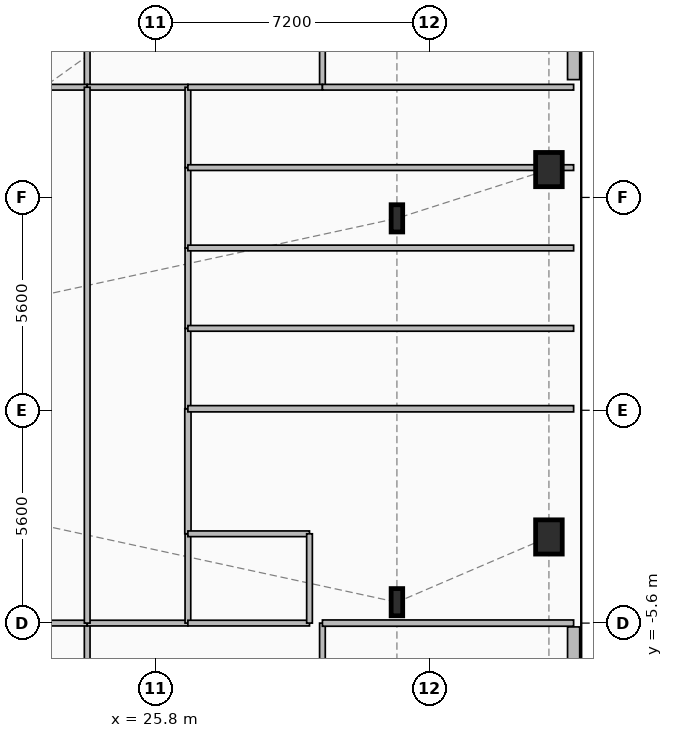
"""IFC4 building model, lengths in metres.
Left out: names, types, materials, properties, quantities, classifications, styles, units other than length and angle.
Written with IfcOpenShell. Run it as: python <this file> out.ifc"""

import sys

from ifc_helpers import new_model, si_unit, direction, frame, frame_2d, origin, origin_2d, place, context, subcontext, project, spatial, rectangle, i_section, extrude, element, fill, save


model = new_model("IFC4")
c1 = context("Model", 3, precision=1e-05, world=origin(), true_north=direction((0.0, 1.0)))
c2 = subcontext(c1, "Body", "Model", "MODEL_VIEW")
j1 = project(units=[si_unit("LENGTHUNIT", "METRE"), si_unit("PLANEANGLEUNIT", "RADIAN")], contexts=[c1])
p1 = place(None, origin())
s1 = spatial("IfcSite", under=j1, at=p1, CompositionType="ELEMENT")
p2 = place(p1, origin())
s2 = spatial("IfcBuilding", under=s1, at=p2, CompositionType="ELEMENT")
p3 = place(p2, frame((0.0, 0.0, 22.5)))
s3 = spatial("IfcBuildingStorey", under=s2, at=p3, CompositionType="ELEMENT", Elevation=22.5)
for number, where, z_axis, x_axis in (
    (1, (36.15, -3.333, 0.0), (0.0, 0.0, 1.0), (1.0, 0.0, 0.0)),
    (2, (36.15, 6.333, 0.0), (0.0, 0.0, 1.0), (1.0, 0.0, 0.0)),
):
    element("IfcColumn", number, at=place(p3, frame(where, z_axis=z_axis, x_axis=x_axis)), inside=s3, PredefinedType="COLUMN", context=c2, shape_type="SweptSolid", body=[
        extrude(rectangle(XDim=0.7, YDim=0.9, at=origin_2d()), origin(), (0.0, 0.0, 1.0), 4.5),
    ])
for number, where, z_axis, x_axis in (
    (3, (32.15, -5.05, 0.0), (0.0, 0.0, 1.0), (1.0, 0.0, 0.0)),
    (4, (32.15, 5.05, 0.0), (0.0, 0.0, 1.0), (1.0, 0.0, 0.0)),
):
    element("IfcColumn", number, at=place(p3, frame(where, z_axis=z_axis, x_axis=x_axis)), inside=s3, PredefinedType="COLUMN", context=c2, shape_type="SweptSolid", body=[
        extrude(i_section(OverallWidth=0.304, OverallDepth=0.716, WebThickness=0.021, FlangeThickness=0.04, FilletRadius=0.027, at=origin_2d()), origin(), (0.0, 0.0, 1.0), 4.5),
    ])
p4 = place(p3, frame((36.8, 24.8, 0.0), z_axis=(0.0, 0.0, 1.0), x_axis=(0.0, -1.0, 0.0)))
e5 = element("IfcWall", 5, at=p4, inside=s3, PredefinedType="SOLIDWALL", context=c2, shape_type="SweptSolid", body=[
    extrude(rectangle(XDim=16.1, YDim=0.32, at=frame_2d((8.05, 0.0))), origin(), (0.0, 0.0, 1.0), 4.16),
])
p5 = place(p4, frame((5.067, 0.0, 0.85)))
e6 = element("IfcOpeningElement", 6, at=p5, cuts=e5, PredefinedType="OPENING", context=c2, shape_type="SweptSolid", body=[
    extrude(rectangle(XDim=2.6, YDim=2.4, at=frame_2d((1.3, 1.2))), frame((0.0, 0.17, 0.0), z_axis=(0.0, -1.0, 0.0), x_axis=(1.0, 0.0, 0.0)), (0.0, 0.0, 1.0), 0.34),
])
p6 = place(p3, frame((36.8, -5.7, 0.0), z_axis=(0.0, 0.0, 1.0), x_axis=(0.0, -1.0, 0.0)))
e7 = element("IfcWall", 7, at=p6, inside=s3, PredefinedType="SOLIDWALL", context=c2, shape_type="SweptSolid", body=[
    extrude(rectangle(XDim=16.1, YDim=0.32, at=frame_2d((8.05, 0.0))), origin(), (0.0, 0.0, 1.0), 4.16),
])
p7 = place(p6, frame((8.485, 0.0, 0.85)))
e8 = element("IfcOpeningElement", 8, at=p7, cuts=e7, PredefinedType="OPENING", context=c2, shape_type="SweptSolid", body=[
    extrude(rectangle(XDim=2.6, YDim=2.4, at=frame_2d((1.3, 1.2))), frame((0.0, 0.17, 0.0), z_axis=(0.0, -1.0, 0.0), x_axis=(1.0, 0.0, 0.0)), (0.0, 0.0, 1.0), 0.34),
])
p8 = place(p3, frame((24.0, 10.65, 0.0), z_axis=(0.0, 0.0, 1.0), x_axis=(0.0, -1.0, 0.0)))
e9 = element("IfcWall", 9, at=p8, inside=s3, PredefinedType="PARTITIONING", context=c2, shape_type="SweptSolid", body=[
    extrude(rectangle(XDim=2.15, YDim=0.15, at=frame_2d((1.075, 0.0))), origin(), (0.0, 0.0, 1.0), 4.16),
])
p9 = place(p8, frame((0.625, 0.0, 0.0)))
e10 = element("IfcOpeningElement", 10, at=p9, cuts=e9, PredefinedType="OPENING", context=c2, shape_type="SweptSolid", body=[
    extrude(rectangle(XDim=0.9, YDim=2.1, at=frame_2d((0.45, 1.05))), frame((0.0, 0.085, 0.0), z_axis=(0.0, -1.0, 0.0), x_axis=(1.0, 0.0, 0.0)), (0.0, 0.0, 1.0), 0.17),
])
p10 = place(p3, frame((24.0, 8.5, 0.0), z_axis=(0.0, 0.0, 1.0), x_axis=(-1.0, 0.0, 0.0)))
e11 = element("IfcWall", 11, at=p10, inside=s3, PredefinedType="PARTITIONING", context=c2, shape_type="SweptSolid", body=[
    extrude(rectangle(XDim=5.2, YDim=0.15, at=frame_2d((2.6, 0.0))), origin(), (0.0, 0.0, 1.0), 4.16),
])
p11 = place(p10, frame((0.954, 0.0, 0.0)))
e12 = element("IfcOpeningElement", 12, at=p11, cuts=e11, PredefinedType="OPENING", context=c2, shape_type="SweptSolid", body=[
    extrude(rectangle(XDim=1.05, YDim=2.15, at=frame_2d((0.525, 1.075))), frame((0.0, 0.085, 0.0), z_axis=(0.0, -1.0, 0.0), x_axis=(1.0, 0.0, 0.0)), (0.0, 0.0, 1.0), 0.17),
])
p12 = place(p3, frame((24.0, -5.6, 0.0), z_axis=(0.0, 0.0, 1.0), x_axis=(0.0, -1.0, 0.0)))
e13 = element("IfcWall", 13, at=p12, inside=s3, PredefinedType="PARTITIONING", context=c2, shape_type="SweptSolid", body=[
    extrude(rectangle(XDim=2.15, YDim=0.15, at=frame_2d((1.075, 0.0))), origin(), (0.0, 0.0, 1.0), 4.16),
])
p13 = place(p12, frame((0.625, 0.0, 0.0)))
e14 = element("IfcOpeningElement", 14, at=p13, cuts=e13, PredefinedType="OPENING", context=c2, shape_type="SweptSolid", body=[
    extrude(rectangle(XDim=0.9, YDim=2.1, at=frame_2d((0.45, 1.05))), frame((0.0, 0.085, 0.0), z_axis=(0.0, -1.0, 0.0), x_axis=(1.0, 0.0, 0.0)), (0.0, 0.0, 1.0), 0.17),
])
p14 = place(p3, frame((18.8, -5.6, 0.0), z_axis=(0.0, 0.0, 1.0), x_axis=(1.0, 0.0, 0.0)))
e15 = element("IfcWall", 15, at=p14, inside=s3, PredefinedType="PARTITIONING", context=c2, shape_type="SweptSolid", body=[
    extrude(rectangle(XDim=5.2, YDim=0.15, at=frame_2d((2.6, 0.0))), origin(), (0.0, 0.0, 1.0), 4.16),
])
p15 = place(p3, frame((24.0, 8.5, 0.0), z_axis=(0.0, 0.0, 1.0), x_axis=(1.0, 0.0, 0.0)))
e16 = element("IfcWall", 16, at=p15, inside=s3, PredefinedType="PARTITIONING", context=c2, shape_type="SweptSolid", body=[
    extrude(rectangle(XDim=2.65, YDim=0.15, at=frame_2d((1.325, 0.0))), origin(), (0.0, 0.0, 1.0), 4.16),
])
p16 = place(p15, frame((0.965, 0.0, 0.0)))
e17 = element("IfcOpeningElement", 17, at=p16, cuts=e16, PredefinedType="OPENING", context=c2, shape_type="SweptSolid", body=[
    extrude(rectangle(XDim=1.05, YDim=2.15, at=frame_2d((0.525, 1.075))), frame((0.0, 0.085, 0.0), z_axis=(0.0, -1.0, 0.0), x_axis=(1.0, 0.0, 0.0)), (0.0, 0.0, 1.0), 0.17),
])
p17 = place(p3, frame((26.65, -5.6, 0.0), z_axis=(0.0, 0.0, 1.0), x_axis=(-1.0, 0.0, 0.0)))
e18 = element("IfcWall", 18, at=p17, inside=s3, PredefinedType="PARTITIONING", context=c2, shape_type="SweptSolid", body=[
    extrude(rectangle(XDim=2.65, YDim=0.15, at=frame_2d((1.325, 0.0))), origin(), (0.0, 0.0, 1.0), 4.16),
])
p18 = place(p17, frame((0.635, 0.0, 0.0)))
e19 = element("IfcOpeningElement", 19, at=p18, cuts=e18, PredefinedType="OPENING", context=c2, shape_type="SweptSolid", body=[
    extrude(rectangle(XDim=1.05, YDim=2.15, at=frame_2d((0.525, 1.075))), frame((0.0, 0.085, 0.0), z_axis=(0.0, -1.0, 0.0), x_axis=(1.0, 0.0, 0.0)), (0.0, 0.0, 1.0), 0.17),
])
p19 = place(p3, frame((26.65, -3.25, 0.0), z_axis=(0.0, 0.0, 1.0), x_axis=(0.0, -1.0, 0.0)))
e20 = element("IfcWall", 20, at=p19, inside=s3, PredefinedType="PLUMBINGWALL", context=c2, shape_type="SweptSolid", body=[
    extrude(rectangle(XDim=2.35, YDim=0.15, at=frame_2d((1.175, 0.0))), origin(), (0.0, 0.0, 1.0), 4.16),
])
p20 = place(p19, frame((0.616, 0.0, 0.0)))
e21 = element("IfcOpeningElement", 21, at=p20, cuts=e20, PredefinedType="OPENING", context=c2, shape_type="SweptSolid", body=[
    extrude(rectangle(XDim=0.9, YDim=2.1, at=frame_2d((0.45, 1.05))), frame((0.0, 0.085, 0.0), z_axis=(0.0, -1.0, 0.0), x_axis=(1.0, 0.0, 0.0)), (0.0, 0.0, 1.0), 0.17),
])
p21 = place(p3, frame((26.65, 0.04, 0.0), z_axis=(0.0, 0.0, 1.0), x_axis=(0.0, -1.0, 0.0)))
e22 = element("IfcWall", 22, at=p21, inside=s3, PredefinedType="PARTITIONING", context=c2, shape_type="SweptSolid", body=[
    extrude(rectangle(XDim=3.29, YDim=0.165, at=frame_2d((1.645, 0.0))), origin(), (0.0, 0.0, 1.0), 4.16),
])
p22 = place(p21, frame((0.702, 0.0, 0.0)))
e23 = element("IfcOpeningElement", 23, at=p22, cuts=e22, PredefinedType="OPENING", context=c2, shape_type="SweptSolid", body=[
    extrude(rectangle(XDim=1.15, YDim=2.15, at=frame_2d((0.575, 1.075))), frame((0.0, 0.093, 0.0), z_axis=(0.0, -1.0, 0.0), x_axis=(1.0, 0.0, 0.0)), (0.0, 0.0, 1.0), 0.185),
])
p23 = place(p3, frame((26.65, 2.155, 0.0), z_axis=(0.0, 0.0, 1.0), x_axis=(0.0, -1.0, 0.0)))
e24 = element("IfcWall", 24, at=p23, inside=s3, PredefinedType="PARTITIONING", context=c2, shape_type="SweptSolid", body=[
    extrude(rectangle(XDim=2.115, YDim=0.15, at=frame_2d((1.058, 0.0))), origin(), (0.0, 0.0, 1.0), 4.16),
])
p24 = place(p23, frame((0.583, 0.0, 0.0)))
e25 = element("IfcOpeningElement", 25, at=p24, cuts=e24, PredefinedType="OPENING", context=c2, shape_type="SweptSolid", body=[
    extrude(rectangle(XDim=0.95, YDim=2.1, at=frame_2d((0.475, 1.05))), frame((0.0, 0.085, 0.0), z_axis=(0.0, -1.0, 0.0), x_axis=(1.0, 0.0, 0.0)), (0.0, 0.0, 1.0), 0.17),
])
p25 = place(p3, frame((26.65, 4.27, 0.0), z_axis=(0.0, 0.0, 1.0), x_axis=(0.0, -1.0, 0.0)))
e26 = element("IfcWall", 26, at=p25, inside=s3, PredefinedType="PARTITIONING", context=c2, shape_type="SweptSolid", body=[
    extrude(rectangle(XDim=2.115, YDim=0.15, at=frame_2d((1.058, 0.0))), origin(), (0.0, 0.0, 1.0), 4.16),
])
p26 = place(p25, frame((0.583, 0.0, 0.0)))
e27 = element("IfcOpeningElement", 27, at=p26, cuts=e26, PredefinedType="OPENING", context=c2, shape_type="SweptSolid", body=[
    extrude(rectangle(XDim=0.95, YDim=2.1, at=frame_2d((0.475, 1.05))), frame((0.0, 0.085, 0.0), z_axis=(0.0, -1.0, 0.0), x_axis=(1.0, 0.0, 0.0)), (0.0, 0.0, 1.0), 0.17),
])
p27 = place(p3, frame((26.65, 6.385, 0.0), z_axis=(0.0, 0.0, 1.0), x_axis=(0.0, -1.0, 0.0)))
e28 = element("IfcWall", 28, at=p27, inside=s3, PredefinedType="PARTITIONING", context=c2, shape_type="SweptSolid", body=[
    extrude(rectangle(XDim=2.115, YDim=0.15, at=frame_2d((1.058, 0.0))), origin(), (0.0, 0.0, 1.0), 4.16),
])
p28 = place(p27, frame((0.583, 0.0, 0.0)))
e29 = element("IfcOpeningElement", 29, at=p28, cuts=e28, PredefinedType="OPENING", context=c2, shape_type="SweptSolid", body=[
    extrude(rectangle(XDim=0.95, YDim=2.1, at=frame_2d((0.475, 1.05))), frame((0.0, 0.085, 0.0), z_axis=(0.0, -1.0, 0.0), x_axis=(1.0, 0.0, 0.0)), (0.0, 0.0, 1.0), 0.17),
])
p29 = place(p3, frame((26.65, 8.5, 0.0), z_axis=(0.0, 0.0, 1.0), x_axis=(0.0, -1.0, 0.0)))
e30 = element("IfcWall", 30, at=p29, inside=s3, PredefinedType="PARTITIONING", context=c2, shape_type="SweptSolid", body=[
    extrude(rectangle(XDim=2.115, YDim=0.15, at=frame_2d((1.058, 0.0))), origin(), (0.0, 0.0, 1.0), 4.16),
])
p30 = place(p29, frame((0.583, 0.0, 0.0)))
e31 = element("IfcOpeningElement", 31, at=p30, cuts=e30, PredefinedType="OPENING", context=c2, shape_type="SweptSolid", body=[
    extrude(rectangle(XDim=0.95, YDim=2.1, at=frame_2d((0.475, 1.05))), frame((0.0, 0.085, 0.0), z_axis=(0.0, -1.0, 0.0), x_axis=(1.0, 0.0, 0.0)), (0.0, 0.0, 1.0), 0.17),
])
p31 = place(p3, frame((24.0, -5.6, 0.0), z_axis=(0.0, 0.0, 1.0), x_axis=(0.0, 1.0, 0.0)))
e32 = element("IfcWall", 32, at=p31, inside=s3, PredefinedType="PARTITIONING", context=c2, shape_type="SweptSolid", body=[
    extrude(rectangle(XDim=14.1, YDim=0.15, at=frame_2d((7.05, 0.0))), origin(), (0.0, 0.0, 1.0), 4.16),
])
p32 = place(p3, frame((30.19, 24.8, 0.0), z_axis=(0.0, 0.0, 1.0), x_axis=(0.0, -1.0, 0.0)))
e33 = element("IfcWall", 33, at=p32, inside=s3, PredefinedType="PARTITIONING", context=c2, shape_type="SweptSolid", body=[
    extrude(rectangle(XDim=16.3, YDim=0.15, at=frame_2d((8.15, 0.0))), origin(), (0.0, 0.0, 1.0), 4.16),
])
p33 = place(p32, frame((12.909, 0.0, 0.0)))
e34 = element("IfcOpeningElement", 34, at=p33, cuts=e33, PredefinedType="OPENING", context=c2, shape_type="SweptSolid", body=[
    extrude(rectangle(XDim=1.05, YDim=2.15, at=frame_2d((0.525, 1.075))), frame((0.0, 0.085, 0.0), z_axis=(0.0, -1.0, 0.0), x_axis=(1.0, 0.0, 0.0)), (0.0, 0.0, 1.0), 0.17),
])
p34 = place(p3, frame((30.19, 8.5, 0.0), z_axis=(0.0, 0.0, 1.0), x_axis=(-1.0, 0.0, 0.0)))
e35 = element("IfcWall", 35, at=p34, inside=s3, PredefinedType="PARTITIONING", context=c2, shape_type="SweptSolid", body=[
    extrude(rectangle(XDim=3.54, YDim=0.15, at=frame_2d((1.77, 0.0))), origin(), (0.0, 0.0, 1.0), 4.16),
])
p35 = place(p3, frame((36.8, 8.5, 0.0), z_axis=(0.0, 0.0, 1.0), x_axis=(-1.0, 0.0, 0.0)))
e36 = element("IfcWall", 36, at=p35, inside=s3, PredefinedType="PARTITIONING", context=c2, shape_type="SweptSolid", body=[
    extrude(rectangle(XDim=6.61, YDim=0.15, at=frame_2d((3.305, 0.0))), origin(), (0.0, 0.0, 1.0), 4.16),
])
p36 = place(p3, frame((30.19, -5.6, 0.0), z_axis=(0.0, 0.0, 1.0), x_axis=(0.0, -1.0, 0.0)))
e37 = element("IfcWall", 37, at=p36, inside=s3, PredefinedType="PARTITIONING", context=c2, shape_type="SweptSolid", body=[
    extrude(rectangle(XDim=16.2, YDim=0.15, at=frame_2d((8.1, 0.0))), origin(), (0.0, 0.0, 1.0), 4.16),
])
p37 = place(p36, frame((4.077, 0.0, 0.0)))
e38 = element("IfcOpeningElement", 38, at=p37, cuts=e37, PredefinedType="OPENING", context=c2, shape_type="SweptSolid", body=[
    extrude(rectangle(XDim=1.05, YDim=2.15, at=frame_2d((0.525, 1.075))), frame((0.0, 0.085, 0.0), z_axis=(0.0, -1.0, 0.0), x_axis=(1.0, 0.0, 0.0)), (0.0, 0.0, 1.0), 0.17),
])
p38 = place(p3, frame((26.65, -5.6, 0.0), z_axis=(0.0, 0.0, 1.0), x_axis=(1.0, 0.0, 0.0)))
e39 = element("IfcWall", 39, at=p38, inside=s3, PredefinedType="PLUMBINGWALL", context=c2, shape_type="SweptSolid", body=[
    extrude(rectangle(XDim=3.2, YDim=0.15, at=frame_2d((1.6, 0.0))), origin(), (0.0, 0.0, 1.0), 4.16),
])
p39 = place(p3, frame((30.19, -5.6, 0.0), z_axis=(0.0, 0.0, 1.0), x_axis=(1.0, 0.0, 0.0)))
e40 = element("IfcWall", 40, at=p39, inside=s3, PredefinedType="PARTITIONING", context=c2, shape_type="SweptSolid", body=[
    extrude(rectangle(XDim=6.61, YDim=0.165, at=frame_2d((3.305, 0.0))), origin(), (0.0, 0.0, 1.0), 4.16),
])
p40 = place(p3, frame((26.65, -3.25, 0.0), z_axis=(0.0, 0.0, 1.0), x_axis=(1.0, 0.0, 0.0)))
e41 = element("IfcWall", 41, at=p40, inside=s3, PredefinedType="PLUMBINGWALL", context=c2, shape_type="SweptSolid", body=[
    extrude(rectangle(XDim=3.2, YDim=0.15, at=frame_2d((1.6, 0.0))), origin(), (0.0, 0.0, 1.0), 4.16),
])
p41 = place(p3, frame((29.85, -3.25, 0.0), z_axis=(0.0, 0.0, 1.0), x_axis=(0.0, -1.0, 0.0)))
e42 = element("IfcWall", 42, at=p41, inside=s3, PredefinedType="PLUMBINGWALL", context=c2, shape_type="SweptSolid", body=[
    extrude(rectangle(XDim=2.35, YDim=0.15, at=frame_2d((1.175, 0.0))), origin(), (0.0, 0.0, 1.0), 4.16),
])
p42 = place(p3, frame((26.65, 0.04, 0.0), z_axis=(0.0, 0.0, 1.0), x_axis=(1.0, 0.0, 0.0)))
e43 = element("IfcWall", 43, at=p42, inside=s3, PredefinedType="PARTITIONING", context=c2, shape_type="SweptSolid", body=[
    extrude(rectangle(XDim=10.15, YDim=0.165, at=frame_2d((5.075, 0.0))), origin(), (0.0, 0.0, 1.0), 4.16),
])
p43 = place(p3, frame((26.65, 2.155, 0.0), z_axis=(0.0, 0.0, 1.0), x_axis=(1.0, 0.0, 0.0)))
e44 = element("IfcWall", 44, at=p43, inside=s3, PredefinedType="PARTITIONING", context=c2, shape_type="SweptSolid", body=[
    extrude(rectangle(XDim=10.15, YDim=0.15, at=frame_2d((5.075, 0.0))), origin(), (0.0, 0.0, 1.0), 4.16),
])
p44 = place(p3, frame((26.65, 4.27, 0.0), z_axis=(0.0, 0.0, 1.0), x_axis=(1.0, 0.0, 0.0)))
e45 = element("IfcWall", 45, at=p44, inside=s3, PredefinedType="PARTITIONING", context=c2, shape_type="SweptSolid", body=[
    extrude(rectangle(XDim=10.15, YDim=0.15, at=frame_2d((5.075, 0.0))), origin(), (0.0, 0.0, 1.0), 3.645),
])
p45 = place(p3, frame((26.65, 6.385, 0.0), z_axis=(0.0, 0.0, 1.0), x_axis=(1.0, 0.0, 0.0)))
e46 = element("IfcWall", 46, at=p45, inside=s3, PredefinedType="PARTITIONING", context=c2, shape_type="SweptSolid", body=[
    extrude(rectangle(XDim=10.15, YDim=0.15, at=frame_2d((5.075, 0.0))), origin(), (0.0, 0.0, 1.0), 3.545),
])
p46 = place(p9, origin())
e47 = element("IfcDoor", 47, at=p46, inside=s3, OperationType="SINGLE_SWING_LEFT", PredefinedType="DOOR", context=c2, shape_type="SweptSolid", body=[
    extrude(rectangle(XDim=0.9, YDim=2.1, at=frame_2d((0.45, 1.05))), frame((0.0, 0.025, 0.0), z_axis=(0.0, -1.0, 0.0), x_axis=(1.0, 0.0, 0.0)), (0.0, 0.0, 1.0), 0.05),
])
fill(e10, e47)
p47 = place(p13, origin())
e48 = element("IfcDoor", 48, at=p47, inside=s3, OperationType="SINGLE_SWING_RIGHT", PredefinedType="DOOR", context=c2, shape_type="SweptSolid", body=[
    extrude(rectangle(XDim=0.9, YDim=2.1, at=frame_2d((0.45, 1.05))), frame((0.0, 0.025, 0.0), z_axis=(0.0, -1.0, 0.0), x_axis=(1.0, 0.0, 0.0)), (0.0, 0.0, 1.0), 0.05),
])
fill(e14, e48)
p48 = place(p16, origin())
e49 = element("IfcDoor", 49, at=p48, inside=s3, OperationType="SINGLE_SWING_RIGHT", PredefinedType="DOOR", context=c2, shape_type="SweptSolid", body=[
    extrude(rectangle(XDim=1.05, YDim=2.15, at=frame_2d((0.525, 1.075))), frame((0.0, 0.025, 0.0), z_axis=(0.0, -1.0, 0.0), x_axis=(1.0, 0.0, 0.0)), (0.0, 0.0, 1.0), 0.05),
])
fill(e17, e49)
p49 = place(p18, origin())
e50 = element("IfcDoor", 50, at=p49, inside=s3, OperationType="SINGLE_SWING_LEFT", PredefinedType="DOOR", context=c2, shape_type="SweptSolid", body=[
    extrude(rectangle(XDim=1.05, YDim=2.15, at=frame_2d((0.525, 1.075))), frame((0.0, 0.025, 0.0), z_axis=(0.0, -1.0, 0.0), x_axis=(1.0, 0.0, 0.0)), (0.0, 0.0, 1.0), 0.05),
])
fill(e19, e50)
p50 = place(p20, origin())
e51 = element("IfcDoor", 51, at=p50, inside=s3, OperationType="SINGLE_SWING_RIGHT", PredefinedType="DOOR", context=c2, shape_type="SweptSolid", body=[
    extrude(rectangle(XDim=0.9, YDim=2.1, at=frame_2d((0.45, 1.05))), frame((0.0, 0.025, 0.0), z_axis=(0.0, -1.0, 0.0), x_axis=(1.0, 0.0, 0.0)), (0.0, 0.0, 1.0), 0.05),
])
fill(e21, e51)
p51 = place(p22, origin())
e52 = element("IfcDoor", 52, at=p51, inside=s3, OperationType="SINGLE_SWING_LEFT", PredefinedType="DOOR", context=c2, shape_type="SweptSolid", body=[
    extrude(rectangle(XDim=1.15, YDim=2.15, at=frame_2d((0.575, 1.075))), frame((0.0, 0.025, 0.0), z_axis=(0.0, -1.0, 0.0), x_axis=(1.0, 0.0, 0.0)), (0.0, 0.0, 1.0), 0.05),
])
fill(e23, e52)
p52 = place(p24, origin())
e53 = element("IfcDoor", 53, at=p52, inside=s3, OperationType="SINGLE_SWING_RIGHT", PredefinedType="DOOR", context=c2, shape_type="SweptSolid", body=[
    extrude(rectangle(XDim=0.95, YDim=2.1, at=frame_2d((0.475, 1.05))), frame((0.0, 0.025, 0.0), z_axis=(0.0, -1.0, 0.0), x_axis=(1.0, 0.0, 0.0)), (0.0, 0.0, 1.0), 0.05),
])
fill(e25, e53)
p53 = place(p26, origin())
e54 = element("IfcDoor", 54, at=p53, inside=s3, OperationType="SINGLE_SWING_LEFT", PredefinedType="DOOR", context=c2, shape_type="SweptSolid", body=[
    extrude(rectangle(XDim=0.95, YDim=2.1, at=frame_2d((0.475, 1.05))), frame((0.0, 0.025, 0.0), z_axis=(0.0, -1.0, 0.0), x_axis=(1.0, 0.0, 0.0)), (0.0, 0.0, 1.0), 0.05),
])
fill(e27, e54)
p54 = place(p28, origin())
e55 = element("IfcDoor", 55, at=p54, inside=s3, OperationType="SINGLE_SWING_RIGHT", PredefinedType="DOOR", context=c2, shape_type="SweptSolid", body=[
    extrude(rectangle(XDim=0.95, YDim=2.1, at=frame_2d((0.475, 1.05))), frame((0.0, 0.025, 0.0), z_axis=(0.0, -1.0, 0.0), x_axis=(1.0, 0.0, 0.0)), (0.0, 0.0, 1.0), 0.05),
])
fill(e29, e55)
p55 = place(p30, origin())
e56 = element("IfcDoor", 56, at=p55, inside=s3, OperationType="SINGLE_SWING_LEFT", PredefinedType="DOOR", context=c2, shape_type="SweptSolid", body=[
    extrude(rectangle(XDim=0.95, YDim=2.1, at=frame_2d((0.475, 1.05))), frame((0.0, 0.025, 0.0), z_axis=(0.0, -1.0, 0.0), x_axis=(1.0, 0.0, 0.0)), (0.0, 0.0, 1.0), 0.05),
])
fill(e31, e56)
save(model, sys.argv[1])
